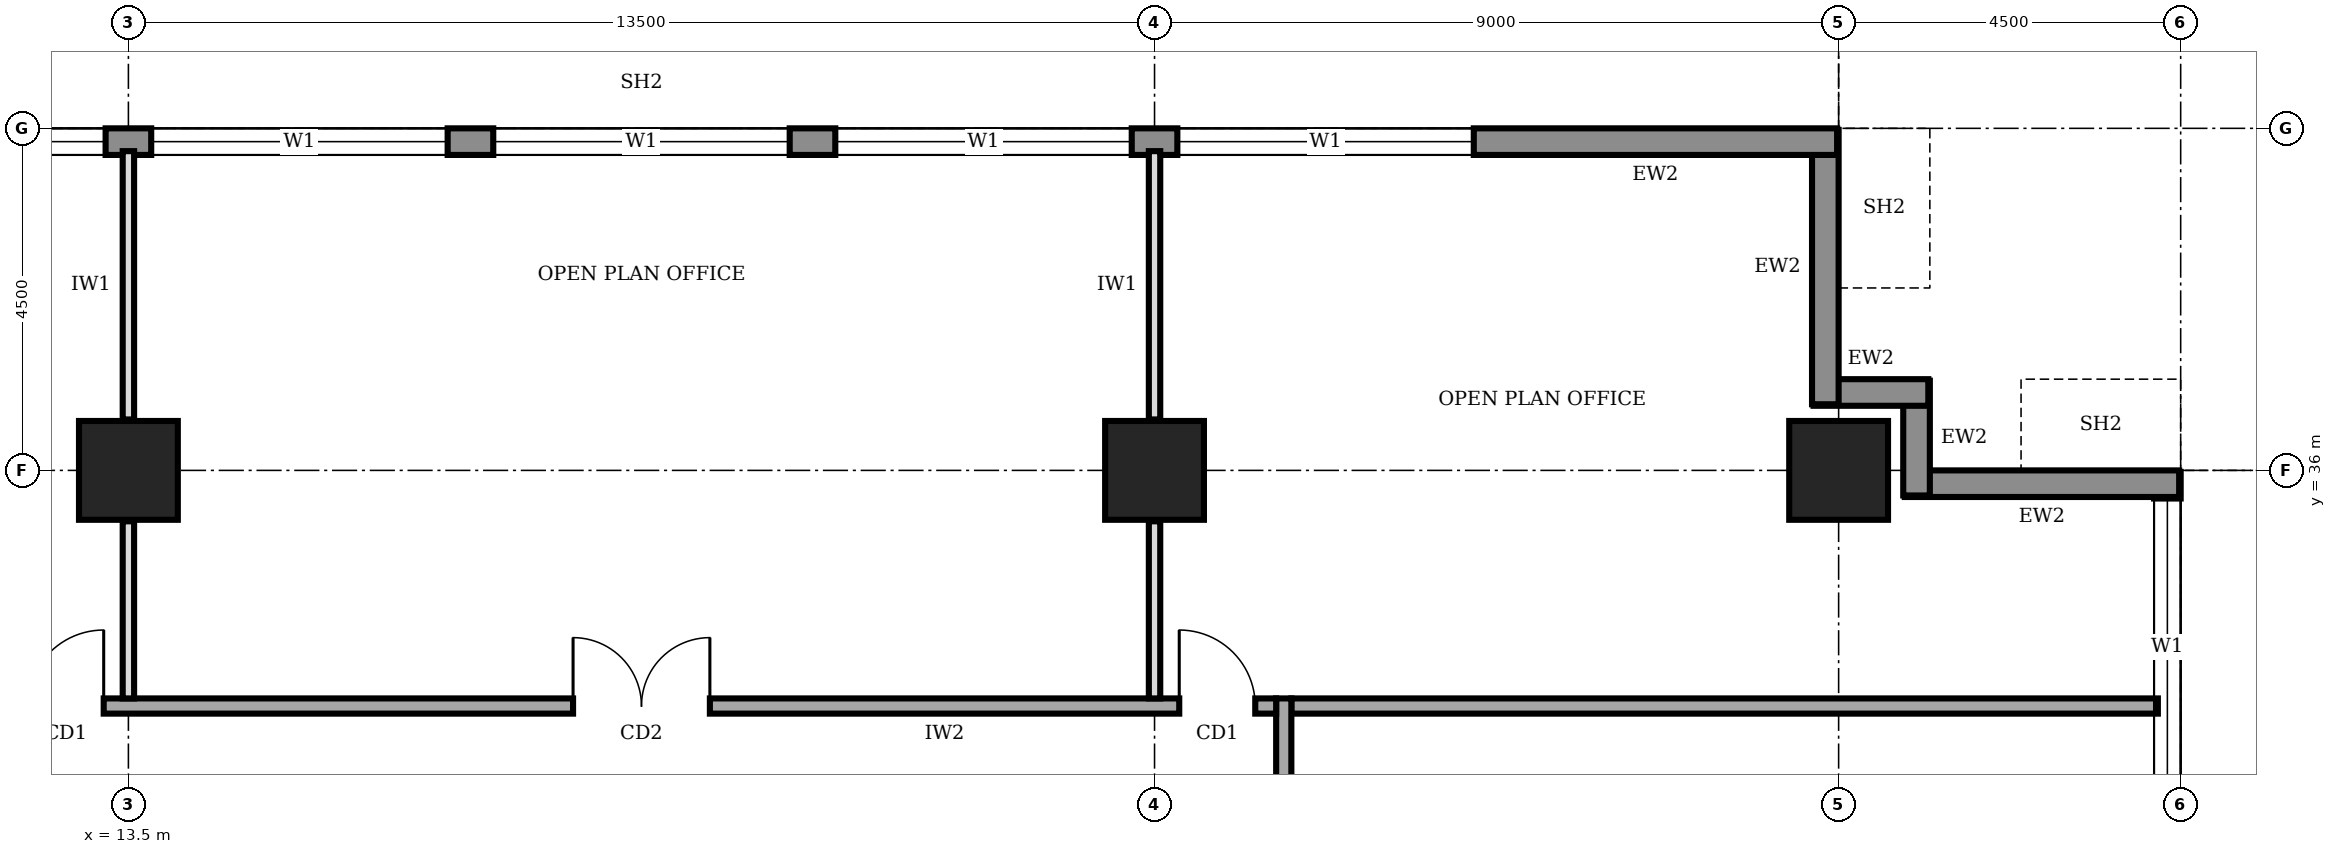
"""IFC4 building model, lengths in metres.
Left out: names, types, materials, properties, quantities, classifications, styles, units other than length and angle.
Written with IfcOpenShell. Run it as: python <this file> out.ifc"""

import sys

from ifc_helpers import new_model, si_unit, direction, frame, frame_2d, origin, origin_2d, place, context, subcontext, project, spatial, rectangle, extrude, element, fill, save


model = new_model("IFC4")
c1 = context("Model", 3, precision=1e-05, world=origin(), true_north=direction((0.0, 1.0)))
c2 = subcontext(c1, "Body", "Model", "MODEL_VIEW")
j1 = project(units=[si_unit("LENGTHUNIT", "METRE"), si_unit("PLANEANGLEUNIT", "RADIAN")], contexts=[c1])
p1 = place(None, origin())
s1 = spatial("IfcSite", under=j1, at=p1, CompositionType="ELEMENT")
p2 = place(p1, origin())
s2 = spatial("IfcBuilding", under=s1, at=p2, CompositionType="ELEMENT")
p3 = place(p2, frame((0.0, 0.0, 277.0)))
s3 = spatial("IfcBuildingStorey", under=s2, at=p3, CompositionType="ELEMENT", Elevation=277.0)
for number, where, z_axis, x_axis in (
    (1, (13.5, 36.0, 0.0), (0.0, 0.0, 1.0), (1.0, 0.0, 0.0)),
    (2, (27.0, 36.0, 0.0), (0.0, 0.0, 1.0), (1.0, 0.0, 0.0)),
    (3, (36.0, 36.0, 0.0), (0.0, 0.0, 1.0), (1.0, 0.0, 0.0)),
):
    element("IfcColumn", number, at=place(p3, frame(where, z_axis=z_axis, x_axis=x_axis)), inside=s3, PredefinedType="COLUMN", context=c2, shape_type="SweptSolid", body=[
        extrude(rectangle(XDim=1.3, YDim=1.3, at=origin_2d()), origin(), (0.0, 0.0, 1.0), 4.0),
    ])
p4 = place(p3, frame((40.325, 4.52, 0.0), z_axis=(0.0, 0.0, 1.0), x_axis=(0.0, 1.0, 0.0)))
e4 = element("IfcWall", 4, at=p4, inside=s3, PredefinedType="STANDARD", context=c2, shape_type="SweptSolid", body=[
    extrude(rectangle(XDim=31.46, YDim=0.35, at=frame_2d((15.73, 0.0))), origin(), (0.0, 0.0, 1.0), 3.75),
])
p5 = place(p4, frame((4.78, 0.0, 0.9)))
e5 = element("IfcOpeningElement", 5, at=p5, cuts=e4, PredefinedType="OPENING", context=c2, shape_type="SweptSolid", body=[
    extrude(rectangle(XDim=3.9, YDim=2.2, at=frame_2d((1.95, 1.1))), frame((0.0, 0.185, 0.0), z_axis=(0.0, -1.0, 0.0), x_axis=(1.0, 0.0, 0.0)), (0.0, 0.0, 1.0), 0.37),
])
p6 = place(p4, frame((9.28, 0.0, 0.9)))
e6 = element("IfcOpeningElement", 6, at=p6, cuts=e4, PredefinedType="OPENING", context=c2, shape_type="SweptSolid", body=[
    extrude(rectangle(XDim=3.9, YDim=2.2, at=frame_2d((1.95, 1.1))), frame((0.0, 0.185, 0.0), z_axis=(0.0, -1.0, 0.0), x_axis=(1.0, 0.0, 0.0)), (0.0, 0.0, 1.0), 0.37),
])
p7 = place(p4, frame((13.78, 0.0, 0.9)))
e7 = element("IfcOpeningElement", 7, at=p7, cuts=e4, PredefinedType="OPENING", context=c2, shape_type="SweptSolid", body=[
    extrude(rectangle(XDim=3.9, YDim=2.2, at=frame_2d((1.95, 1.1))), frame((0.0, 0.185, 0.0), z_axis=(0.0, -1.0, 0.0), x_axis=(1.0, 0.0, 0.0)), (0.0, 0.0, 1.0), 0.37),
])
p8 = place(p4, frame((18.28, 0.0, 0.9)))
e8 = element("IfcOpeningElement", 8, at=p8, cuts=e4, PredefinedType="OPENING", context=c2, shape_type="SweptSolid", body=[
    extrude(rectangle(XDim=3.9, YDim=2.2, at=frame_2d((1.95, 1.1))), frame((0.0, 0.185, 0.0), z_axis=(0.0, -1.0, 0.0), x_axis=(1.0, 0.0, 0.0)), (0.0, 0.0, 1.0), 0.37),
])
p9 = place(p4, frame((22.78, 0.0, 0.9)))
e9 = element("IfcOpeningElement", 9, at=p9, cuts=e4, PredefinedType="OPENING", context=c2, shape_type="SweptSolid", body=[
    extrude(rectangle(XDim=3.9, YDim=2.2, at=frame_2d((1.95, 1.1))), frame((0.0, 0.185, 0.0), z_axis=(0.0, -1.0, 0.0), x_axis=(1.0, 0.0, 0.0)), (0.0, 0.0, 1.0), 0.37),
])
p10 = place(p4, frame((27.21, 0.0, 0.9)))
e10 = element("IfcOpeningElement", 10, at=p10, cuts=e4, PredefinedType="OPENING", context=c2, shape_type="SweptSolid", body=[
    extrude(rectangle(XDim=3.9, YDim=2.2, at=frame_2d((1.95, 1.1))), frame((0.0, 0.185, 0.0), z_axis=(0.0, -1.0, 0.0), x_axis=(1.0, 0.0, 0.0)), (0.0, 0.0, 1.0), 0.37),
])
p11 = place(p3, frame((40.48, 35.825, 0.0), z_axis=(0.0, 0.0, 1.0), x_axis=(-1.0, 0.0, 0.0)))
e11 = element("IfcWall", 11, at=p11, inside=s3, PredefinedType="STANDARD", context=c2, shape_type="SweptSolid", body=[
    extrude(rectangle(XDim=3.61, YDim=0.35, at=frame_2d((1.805, 0.0))), origin(), (0.0, 0.0, 1.0), 2.85),
])
for number, where, z_axis, x_axis in (
    (12, (37.025, 35.67, 0.0), (0.0, 0.0, 1.0), (0.0, 1.0, 0.0)),
    (13, (37.18, 37.025, 0.0), (0.0, 0.0, 1.0), (-1.0, 0.0, 0.0)),
):
    element("IfcWall", number, at=place(p3, frame(where, z_axis=z_axis, x_axis=x_axis)), inside=s3, PredefinedType="STANDARD", context=c2, shape_type="SweptSolid", body=[
        extrude(rectangle(XDim=1.51, YDim=0.35, at=frame_2d((0.755, 0.0))), origin(), (0.0, 0.0, 1.0), 3.75),
    ])
p12 = place(p3, frame((35.825, 36.87, 0.0), z_axis=(0.0, 0.0, 1.0), x_axis=(0.0, 1.0, 0.0)))
e14 = element("IfcWall", 14, at=p12, inside=s3, PredefinedType="STANDARD", context=c2, shape_type="SweptSolid", body=[
    extrude(rectangle(XDim=3.61, YDim=0.35, at=frame_2d((1.805, 0.0))), origin(), (0.0, 0.0, 1.0), 2.85),
])
p13 = place(p3, frame((35.98, 40.325, 0.0), z_axis=(0.0, 0.0, 1.0), x_axis=(-1.0, 0.0, 0.0)))
e15 = element("IfcWall", 15, at=p13, inside=s3, PredefinedType="STANDARD", context=c2, shape_type="SweptSolid", body=[
    extrude(rectangle(XDim=31.46, YDim=0.35, at=frame_2d((15.73, 0.0))), origin(), (0.0, 0.0, 1.0), 3.75),
])
p14 = place(p13, frame((27.21, 0.0, 0.9)))
e16 = element("IfcOpeningElement", 16, at=p14, cuts=e15, PredefinedType="OPENING", context=c2, shape_type="SweptSolid", body=[
    extrude(rectangle(XDim=3.9, YDim=2.2, at=frame_2d((1.95, 1.1))), frame((0.0, 0.185, 0.0), z_axis=(0.0, -1.0, 0.0), x_axis=(1.0, 0.0, 0.0)), (0.0, 0.0, 1.0), 0.37),
])
p15 = place(p13, frame((22.78, 0.0, 0.9)))
e17 = element("IfcOpeningElement", 17, at=p15, cuts=e15, PredefinedType="OPENING", context=c2, shape_type="SweptSolid", body=[
    extrude(rectangle(XDim=3.9, YDim=2.2, at=frame_2d((1.95, 1.1))), frame((0.0, 0.185, 0.0), z_axis=(0.0, -1.0, 0.0), x_axis=(1.0, 0.0, 0.0)), (0.0, 0.0, 1.0), 0.37),
])
p16 = place(p13, frame((18.28, 0.0, 0.9)))
e18 = element("IfcOpeningElement", 18, at=p16, cuts=e15, PredefinedType="OPENING", context=c2, shape_type="SweptSolid", body=[
    extrude(rectangle(XDim=3.9, YDim=2.2, at=frame_2d((1.95, 1.1))), frame((0.0, 0.185, 0.0), z_axis=(0.0, -1.0, 0.0), x_axis=(1.0, 0.0, 0.0)), (0.0, 0.0, 1.0), 0.37),
])
p17 = place(p13, frame((13.78, 0.0, 0.9)))
e19 = element("IfcOpeningElement", 19, at=p17, cuts=e15, PredefinedType="OPENING", context=c2, shape_type="SweptSolid", body=[
    extrude(rectangle(XDim=3.9, YDim=2.2, at=frame_2d((1.95, 1.1))), frame((0.0, 0.185, 0.0), z_axis=(0.0, -1.0, 0.0), x_axis=(1.0, 0.0, 0.0)), (0.0, 0.0, 1.0), 0.37),
])
p18 = place(p13, frame((9.28, 0.0, 0.9)))
e20 = element("IfcOpeningElement", 20, at=p18, cuts=e15, PredefinedType="OPENING", context=c2, shape_type="SweptSolid", body=[
    extrude(rectangle(XDim=3.9, YDim=2.2, at=frame_2d((1.95, 1.1))), frame((0.0, 0.185, 0.0), z_axis=(0.0, -1.0, 0.0), x_axis=(1.0, 0.0, 0.0)), (0.0, 0.0, 1.0), 0.37),
])
p19 = place(p13, frame((4.78, 0.0, 0.9)))
e21 = element("IfcOpeningElement", 21, at=p19, cuts=e15, PredefinedType="OPENING", context=c2, shape_type="SweptSolid", body=[
    extrude(rectangle(XDim=3.9, YDim=2.2, at=frame_2d((1.95, 1.1))), frame((0.0, 0.185, 0.0), z_axis=(0.0, -1.0, 0.0), x_axis=(1.0, 0.0, 0.0)), (0.0, 0.0, 1.0), 0.37),
])
p20 = place(p3, frame((28.7, 9.2, 0.0), z_axis=(0.0, 0.0, 1.0), x_axis=(0.0, 1.0, 0.0)))
e22 = element("IfcWall", 22, at=p20, inside=s3, PredefinedType="SOLIDWALL", context=c2, shape_type="SweptSolid", body=[
    extrude(rectangle(XDim=23.8, YDim=0.2, at=frame_2d((11.9, 0.0))), origin(), (0.0, 0.0, 1.0), 3.75),
])
p21 = place(p20, frame((3.4, 0.0, 0.0)))
e23 = element("IfcOpeningElement", 23, at=p21, cuts=e22, PredefinedType="OPENING", context=c2, shape_type="SweptSolid", body=[
    extrude(rectangle(XDim=1.8, YDim=2.1, at=frame_2d((0.9, 1.05))), frame((0.0, 0.11, 0.0), z_axis=(0.0, -1.0, 0.0), x_axis=(1.0, 0.0, 0.0)), (0.0, 0.0, 1.0), 0.22),
])
p22 = place(p20, frame((10.55, 0.0, 0.0)))
e24 = element("IfcOpeningElement", 24, at=p22, cuts=e22, PredefinedType="OPENING", context=c2, shape_type="SweptSolid", body=[
    extrude(rectangle(XDim=1.0, YDim=2.1, at=frame_2d((0.5, 1.05))), frame((0.0, 0.11, 0.0), z_axis=(0.0, -1.0, 0.0), x_axis=(1.0, 0.0, 0.0)), (0.0, 0.0, 1.0), 0.22),
])
p23 = place(p20, frame((17.65, 0.0, 0.0)))
e25 = element("IfcOpeningElement", 25, at=p23, cuts=e22, PredefinedType="OPENING", context=c2, shape_type="SweptSolid", body=[
    extrude(rectangle(XDim=1.8, YDim=2.1, at=frame_2d((0.9, 1.05))), frame((0.0, 0.11, 0.0), z_axis=(0.0, -1.0, 0.0), x_axis=(1.0, 0.0, 0.0)), (0.0, 0.0, 1.0), 0.22),
])
p24 = place(p3, frame((28.6, 32.9, 0.0), z_axis=(0.0, 0.0, 1.0), x_axis=(-1.0, 0.0, 0.0)))
e26 = element("IfcWall", 26, at=p24, inside=s3, PredefinedType="SOLIDWALL", context=c2, shape_type="SweptSolid", body=[
    extrude(rectangle(XDim=16.9, YDim=0.2, at=frame_2d((8.45, 0.0))), origin(), (0.0, 0.0, 1.0), 3.75),
])
p25 = place(p24, frame((15.425, 0.0, 0.0)))
e27 = element("IfcOpeningElement", 27, at=p25, cuts=e26, PredefinedType="OPENING", context=c2, shape_type="SweptSolid", body=[
    extrude(rectangle(XDim=1.0, YDim=2.1, at=frame_2d((0.5, 1.05))), frame((0.0, 0.11, 0.0), z_axis=(0.0, -1.0, 0.0), x_axis=(1.0, 0.0, 0.0)), (0.0, 0.0, 1.0), 0.22),
])
p26 = place(p24, frame((7.45, 0.0, 0.0)))
e28 = element("IfcOpeningElement", 28, at=p26, cuts=e26, PredefinedType="OPENING", context=c2, shape_type="SweptSolid", body=[
    extrude(rectangle(XDim=1.8, YDim=2.1, at=frame_2d((0.9, 1.05))), frame((0.0, 0.11, 0.0), z_axis=(0.0, -1.0, 0.0), x_axis=(1.0, 0.0, 0.0)), (0.0, 0.0, 1.0), 0.22),
])
p27 = place(p24, frame((0.275, 0.0, 0.0)))
e29 = element("IfcOpeningElement", 29, at=p27, cuts=e26, PredefinedType="OPENING", context=c2, shape_type="SweptSolid", body=[
    extrude(rectangle(XDim=1.0, YDim=2.1, at=frame_2d((0.5, 1.05))), frame((0.0, 0.11, 0.0), z_axis=(0.0, -1.0, 0.0), x_axis=(1.0, 0.0, 0.0)), (0.0, 0.0, 1.0), 0.22),
])
p28 = place(p3, frame((28.8, 32.9, 0.0), z_axis=(0.0, 0.0, 1.0), x_axis=(1.0, 0.0, 0.0)))
e30 = element("IfcWall", 30, at=p28, inside=s3, PredefinedType="SOLIDWALL", context=c2, shape_type="SweptSolid", body=[
    extrude(rectangle(XDim=11.4, YDim=0.2, at=frame_2d((5.7, 0.0))), origin(), (0.0, 0.0, 1.0), 3.75),
])
p29 = place(p3, frame((13.5, 33.0, 0.0), z_axis=(0.0, 0.0, 1.0), x_axis=(0.0, 1.0, 0.0)))
e31 = element("IfcWall", 31, at=p29, inside=s3, PredefinedType="PARTITIONING", context=c2, shape_type="SweptSolid", body=[
    extrude(rectangle(XDim=2.33, YDim=0.15, at=frame_2d((1.165, 0.0))), origin(), (0.0, 0.0, 1.0), 2.85),
])
p30 = place(p3, frame((13.5, 36.67, 0.0), z_axis=(0.0, 0.0, 1.0), x_axis=(0.0, 1.0, 0.0)))
e32 = element("IfcWall", 32, at=p30, inside=s3, PredefinedType="PARTITIONING", context=c2, shape_type="SweptSolid", body=[
    extrude(rectangle(XDim=3.53, YDim=0.15, at=frame_2d((1.765, 0.0))), origin(), (0.0, 0.0, 1.0), 2.85),
])
p31 = place(p3, frame((27.0, 33.0, 0.0), z_axis=(0.0, 0.0, 1.0), x_axis=(0.0, 1.0, 0.0)))
e33 = element("IfcWall", 33, at=p31, inside=s3, PredefinedType="PARTITIONING", context=c2, shape_type="SweptSolid", body=[
    extrude(rectangle(XDim=2.33, YDim=0.15, at=frame_2d((1.165, 0.0))), origin(), (0.0, 0.0, 1.0), 2.85),
])
p32 = place(p3, frame((27.0, 36.67, 0.0), z_axis=(0.0, 0.0, 1.0), x_axis=(0.0, 1.0, 0.0)))
e34 = element("IfcWall", 34, at=p32, inside=s3, PredefinedType="PARTITIONING", context=c2, shape_type="SweptSolid", body=[
    extrude(rectangle(XDim=3.53, YDim=0.15, at=frame_2d((1.765, 0.0))), origin(), (0.0, 0.0, 1.0), 2.85),
])
p33 = place(p10, origin())
e35 = element("IfcWindow", 35, at=p33, inside=s3, PartitioningType="SINGLE_PANEL", PredefinedType="WINDOW", context=c2, shape_type="SweptSolid", body=[
    extrude(rectangle(XDim=3.9, YDim=2.2, at=frame_2d((1.95, 1.1))), frame((0.0, 0.03, 0.0), z_axis=(0.0, -1.0, 0.0), x_axis=(1.0, 0.0, 0.0)), (0.0, 0.0, 1.0), 0.06),
])
fill(e10, e35)
p34 = place(p15, origin())
e36 = element("IfcWindow", 36, at=p34, inside=s3, PartitioningType="SINGLE_PANEL", PredefinedType="WINDOW", context=c2, shape_type="SweptSolid", body=[
    extrude(rectangle(XDim=3.9, YDim=2.2, at=frame_2d((1.95, 1.1))), frame((0.0, 0.03, 0.0), z_axis=(0.0, -1.0, 0.0), x_axis=(1.0, 0.0, 0.0)), (0.0, 0.0, 1.0), 0.06),
])
fill(e17, e36)
p35 = place(p16, origin())
e37 = element("IfcWindow", 37, at=p35, inside=s3, PartitioningType="SINGLE_PANEL", PredefinedType="WINDOW", context=c2, shape_type="SweptSolid", body=[
    extrude(rectangle(XDim=3.9, YDim=2.2, at=frame_2d((1.95, 1.1))), frame((0.0, 0.03, 0.0), z_axis=(0.0, -1.0, 0.0), x_axis=(1.0, 0.0, 0.0)), (0.0, 0.0, 1.0), 0.06),
])
fill(e18, e37)
p36 = place(p17, origin())
e38 = element("IfcWindow", 38, at=p36, inside=s3, PartitioningType="SINGLE_PANEL", PredefinedType="WINDOW", context=c2, shape_type="SweptSolid", body=[
    extrude(rectangle(XDim=3.9, YDim=2.2, at=frame_2d((1.95, 1.1))), frame((0.0, 0.03, 0.0), z_axis=(0.0, -1.0, 0.0), x_axis=(1.0, 0.0, 0.0)), (0.0, 0.0, 1.0), 0.06),
])
fill(e19, e38)
p37 = place(p18, origin())
e39 = element("IfcWindow", 39, at=p37, inside=s3, PartitioningType="SINGLE_PANEL", PredefinedType="WINDOW", context=c2, shape_type="SweptSolid", body=[
    extrude(rectangle(XDim=3.9, YDim=2.2, at=frame_2d((1.95, 1.1))), frame((0.0, 0.03, 0.0), z_axis=(0.0, -1.0, 0.0), x_axis=(1.0, 0.0, 0.0)), (0.0, 0.0, 1.0), 0.06),
])
fill(e20, e39)
p38 = place(p19, origin())
e40 = element("IfcWindow", 40, at=p38, inside=s3, PartitioningType="SINGLE_PANEL", PredefinedType="WINDOW", context=c2, shape_type="SweptSolid", body=[
    extrude(rectangle(XDim=3.9, YDim=2.2, at=frame_2d((1.95, 1.1))), frame((0.0, 0.03, 0.0), z_axis=(0.0, -1.0, 0.0), x_axis=(1.0, 0.0, 0.0)), (0.0, 0.0, 1.0), 0.06),
])
fill(e21, e40)
p39 = place(p25, frame((1.0, 0.0, 0.0), z_axis=(0.0, 0.0, 1.0), x_axis=(-1.0, 0.0, 0.0)))
e41 = element("IfcDoor", 41, at=p39, inside=s3, OperationType="SINGLE_SWING_RIGHT", PredefinedType="DOOR", context=c2, shape_type="SweptSolid", body=[
    extrude(rectangle(XDim=1.0, YDim=2.1, at=frame_2d((0.5, 1.05))), frame((0.0, 0.025, 0.0), z_axis=(0.0, -1.0, 0.0), x_axis=(1.0, 0.0, 0.0)), (0.0, 0.0, 1.0), 0.05),
])
fill(e27, e41)
p40 = place(p26, frame((1.8, 0.0, 0.0), z_axis=(0.0, 0.0, 1.0), x_axis=(-1.0, 0.0, 0.0)))
e42 = element("IfcDoor", 42, at=p40, inside=s3, OperationType="DOUBLE_DOOR_SINGLE_SWING", PredefinedType="DOOR", context=c2, shape_type="SweptSolid", body=[
    extrude(rectangle(XDim=1.8, YDim=2.1, at=frame_2d((0.9, 1.05))), frame((0.0, 0.025, 0.0), z_axis=(0.0, -1.0, 0.0), x_axis=(1.0, 0.0, 0.0)), (0.0, 0.0, 1.0), 0.05),
])
fill(e28, e42)
p41 = place(p27, frame((1.0, 0.0, 0.0), z_axis=(0.0, 0.0, 1.0), x_axis=(-1.0, 0.0, 0.0)))
e43 = element("IfcDoor", 43, at=p41, inside=s3, OperationType="SINGLE_SWING_LEFT", PredefinedType="DOOR", context=c2, shape_type="SweptSolid", body=[
    extrude(rectangle(XDim=1.0, YDim=2.1, at=frame_2d((0.5, 1.05))), frame((0.0, 0.025, 0.0), z_axis=(0.0, -1.0, 0.0), x_axis=(1.0, 0.0, 0.0)), (0.0, 0.0, 1.0), 0.05),
])
fill(e29, e43)
save(model, sys.argv[1])
